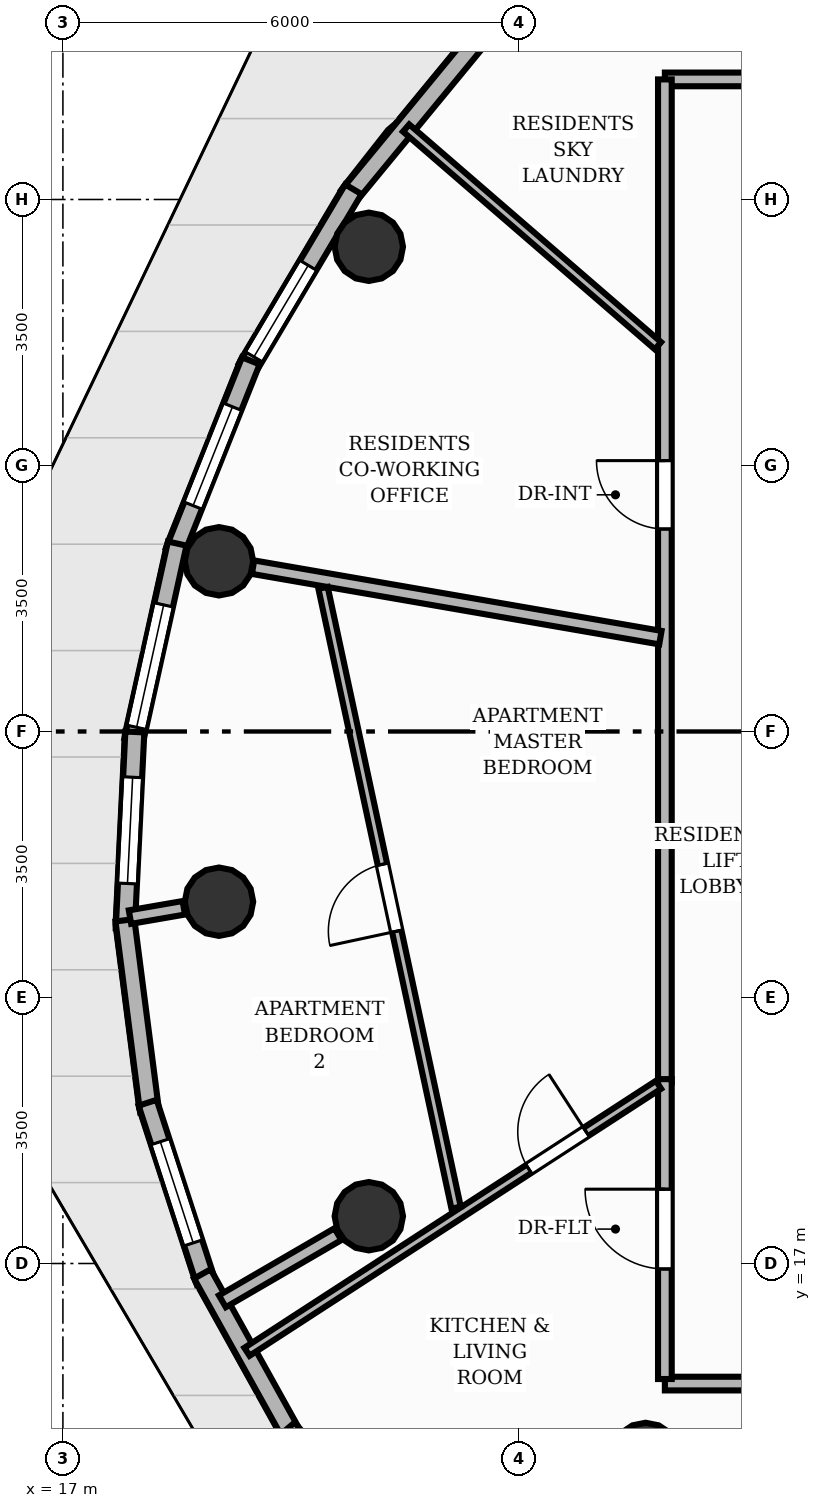
"""IFC4 building model, lengths in metres.
Left out: names, types, materials, properties, quantities, classifications, styles, units other than length and angle.
Written with IfcOpenShell. Run it as: python <this file> out.ifc"""

import sys

from ifc_helpers import new_model, si_unit, direction, frame, frame_2d, origin, origin_2d, place, context, subcontext, project, spatial, rectangle, circle, extrude, element, fill, save


model = new_model("IFC4")
c1 = context("Model", 3, precision=1e-05, world=origin(), true_north=direction((0.0, 1.0)))
c2 = subcontext(c1, "Body", "Model", "MODEL_VIEW")
j1 = project(units=[si_unit("LENGTHUNIT", "METRE"), si_unit("PLANEANGLEUNIT", "RADIAN")], contexts=[c1])
p1 = place(None, origin())
s1 = spatial("IfcSite", under=j1, at=p1, CompositionType="ELEMENT")
p2 = place(p1, origin())
s2 = spatial("IfcBuilding", under=s1, at=p2, CompositionType="ELEMENT")
p3 = place(p2, frame((0.0, 0.0, 185.44)))
s3 = spatial("IfcBuildingStorey", under=s2, at=p3, CompositionType="ELEMENT", Elevation=185.44)
for number, where, z_axis, x_axis in (
    (1, (21.025, 30.378, 0.0), (0.0, 0.0, 1.0), (1.0, 0.0, 0.0)),
    (2, (19.054, 26.24, 0.0), (0.0, 0.0, 1.0), (1.0, 0.0, 0.0)),
    (3, (19.054, 21.76, 0.0), (0.0, 0.0, 1.0), (1.0, 0.0, 0.0)),
    (4, (21.025, 17.622, 0.0), (0.0, 0.0, 1.0), (1.0, 0.0, 0.0)),
    (5, (24.667, 14.455, 0.0), (0.0, 0.0, 1.0), (1.0, 0.0, 0.0)),
):
    element("IfcColumn", number, at=place(p3, frame(where, z_axis=z_axis, x_axis=x_axis)), inside=s3, PredefinedType="COLUMN", context=c2, shape_type="SweptSolid", body=[
        extrude(circle(Radius=0.45, at=origin_2d()), origin(), (0.0, 0.0, 1.0), 3.2),
    ])
p4 = place(p3, frame((20.759, 31.045, 0.0), z_axis=(0.0, 0.0, 1.0), x_axis=(0.635409334306, 0.772175483861, 0.0)))
e6 = element("IfcWall", 6, at=p4, inside=s3, PredefinedType="SOLIDWALL", context=c2, shape_type="SweptSolid", body=[
    extrude(rectangle(XDim=2.758, YDim=0.25, at=frame_2d((1.379, 0.0))), origin(), (0.0, 0.0, 1.0), 2.96),
])
p5 = place(p3, frame((19.424, 28.779, 0.0), z_axis=(0.0, 0.0, 1.0), x_axis=(0.510320389621, 0.859984360287, 0.0)))
e7 = element("IfcWall", 7, at=p5, inside=s3, PredefinedType="SOLIDWALL", context=c2, shape_type="SweptSolid", body=[
    extrude(rectangle(XDim=2.738, YDim=0.25, at=frame_2d((1.369, 0.0))), origin(), (0.0, 0.0, 1.0), 2.96),
])
p6 = place(p5, frame((0.175, 0.0, 0.85)))
e8 = element("IfcOpeningElement", 8, at=p6, cuts=e7, PredefinedType="OPENING", context=c2, shape_type="SweptSolid", body=[
    extrude(rectangle(XDim=1.4, YDim=1.55, at=frame_2d((0.7, 0.775))), frame((0.0, 0.135, 0.0), z_axis=(0.0, -1.0, 0.0), x_axis=(1.0, 0.0, 0.0)), (0.0, 0.0, 1.0), 0.27),
])
p7 = place(p3, frame((18.472, 26.367, 0.0), z_axis=(0.0, 0.0, 1.0), x_axis=(0.370330939431, 0.928899884433, 0.0)))
e9 = element("IfcWall", 9, at=p7, inside=s3, PredefinedType="SOLIDWALL", context=c2, shape_type="SweptSolid", body=[
    extrude(rectangle(XDim=2.702, YDim=0.25, at=frame_2d((1.351, 0.0))), origin(), (0.0, 0.0, 1.0), 2.96),
])
p8 = place(p7, frame((0.651, 0.0, 0.85)))
e10 = element("IfcOpeningElement", 10, at=p8, cuts=e9, PredefinedType="OPENING", context=c2, shape_type="SweptSolid", body=[
    extrude(rectangle(XDim=1.4, YDim=1.55, at=frame_2d((0.7, 0.775))), frame((0.0, 0.135, 0.0), z_axis=(0.0, -1.0, 0.0), x_axis=(1.0, 0.0, 0.0)), (0.0, 0.0, 1.0), 0.27),
])
p9 = place(p3, frame((17.932, 23.884, 0.0), z_axis=(0.0, 0.0, 1.0), x_axis=(0.215877166516, 0.976420528756, 0.0)))
e11 = element("IfcWall", 11, at=p9, inside=s3, PredefinedType="SOLIDWALL", context=c2, shape_type="SweptSolid", body=[
    extrude(rectangle(XDim=2.651, YDim=0.25, at=frame_2d((1.325, 0.0))), origin(), (0.0, 0.0, 1.0), 2.96),
])
p10 = place(p9, frame((0.175, 0.0, 0.85)))
e12 = element("IfcOpeningElement", 12, at=p10, cuts=e11, PredefinedType="OPENING", context=c2, shape_type="SweptSolid", body=[
    extrude(rectangle(XDim=1.65, YDim=1.55, at=frame_2d((0.825, 0.775))), frame((0.0, 0.135, 0.0), z_axis=(0.0, -1.0, 0.0), x_axis=(1.0, 0.0, 0.0)), (0.0, 0.0, 1.0), 0.27),
])
p11 = place(p3, frame((17.82, 21.405, 0.0), z_axis=(0.0, 0.0, 1.0), x_axis=(0.048688181414, 0.99881402723, 0.0)))
e13 = element("IfcWall", 13, at=p11, inside=s3, PredefinedType="SOLIDWALL", context=c2, shape_type="SweptSolid", body=[
    extrude(rectangle(XDim=2.593, YDim=0.25, at=frame_2d((1.296, 0.0))), origin(), (0.0, 0.0, 1.0), 2.96),
])
p12 = place(p11, frame((0.596, 0.0, 0.85)))
e14 = element("IfcOpeningElement", 14, at=p12, cuts=e13, PredefinedType="OPENING", context=c2, shape_type="SweptSolid", body=[
    extrude(rectangle(XDim=1.4, YDim=1.55, at=frame_2d((0.7, 0.775))), frame((0.0, 0.135, 0.0), z_axis=(0.0, -1.0, 0.0), x_axis=(1.0, 0.0, 0.0)), (0.0, 0.0, 1.0), 0.27),
])
p13 = place(p3, frame((18.14, 19.005, 0.0), z_axis=(0.0, 0.0, 1.0), x_axis=(-0.128057007482, 0.991766808698, 0.0)))
e15 = element("IfcWall", 15, at=p13, inside=s3, PredefinedType="SOLIDWALL", context=c2, shape_type="SweptSolid", body=[
    extrude(rectangle(XDim=2.532, YDim=0.25, at=frame_2d((1.266, 0.0))), origin(), (0.0, 0.0, 1.0), 2.96),
])
p14 = place(p3, frame((18.881, 16.759, 0.0), z_axis=(0.0, 0.0, 1.0), x_axis=(-0.309005861828, 0.951060133407, 0.0)))
e16 = element("IfcWall", 16, at=p14, inside=s3, PredefinedType="SOLIDWALL", context=c2, shape_type="SweptSolid", body=[
    extrude(rectangle(XDim=2.478, YDim=0.25, at=frame_2d((1.239, 0.0))), origin(), (0.0, 0.0, 1.0), 2.96),
])
p15 = place(p14, frame((0.539, 0.0, 0.85)))
e17 = element("IfcOpeningElement", 17, at=p15, cuts=e16, PredefinedType="OPENING", context=c2, shape_type="SweptSolid", body=[
    extrude(rectangle(XDim=1.4, YDim=1.55, at=frame_2d((0.7, 0.775))), frame((0.0, 0.135, 0.0), z_axis=(0.0, -1.0, 0.0), x_axis=(1.0, 0.0, 0.0)), (0.0, 0.0, 1.0), 0.27),
])
p16 = place(p3, frame((20.019, 14.733, 0.0), z_axis=(0.0, 0.0, 1.0), x_axis=(-0.485821561791, 0.874058013005, 0.0)))
e18 = element("IfcWall", 18, at=p16, inside=s3, PredefinedType="SOLIDWALL", context=c2, shape_type="SweptSolid", body=[
    extrude(rectangle(XDim=2.437, YDim=0.25, at=frame_2d((1.218, 0.0))), origin(), (0.0, 0.0, 1.0), 2.96),
])
p17 = place(p3, frame((21.521, 12.99, 0.0), z_axis=(0.0, 0.0, 1.0), x_axis=(-0.648874307696, 0.760895612297, 0.0)))
e19 = element("IfcWall", 19, at=p17, inside=s3, PredefinedType="SOLIDWALL", context=c2, shape_type="SweptSolid", body=[
    extrude(rectangle(XDim=2.415, YDim=0.25, at=frame_2d((1.208, 0.0))), origin(), (0.0, 0.0, 1.0), 2.96),
])
p18 = place(p17, frame((0.632, 0.0, 0.0)))
e20 = element("IfcOpeningElement", 20, at=p18, cuts=e19, PredefinedType="OPENING", context=c2, shape_type="SweptSolid", body=[
    extrude(rectangle(XDim=1.15, YDim=2.2, at=frame_2d((0.575, 1.1))), frame((0.0, 0.135, 0.0), z_axis=(0.0, -1.0, 0.0), x_axis=(1.0, 0.0, 0.0)), (0.0, 0.0, 1.0), 0.27),
])
p19 = place(p3, frame((18.591, 21.68, 0.0), z_axis=(0.0, 0.0, 1.0), x_axis=(-0.985336223431, -0.170623933826, 0.0)))
e21 = element("IfcWall", 21, at=p19, inside=s3, PredefinedType="PARTITIONING", context=c2, shape_type="SweptSolid", body=[
    extrude(rectangle(XDim=0.718, YDim=0.18, at=frame_2d((0.359, 0.0))), origin(), (0.0, 0.0, 1.0), 2.404),
])
p20 = place(p3, frame((20.618, 17.386, 0.0), z_axis=(0.0, 0.0, 1.0), x_axis=(-0.86461381872, -0.502437005482, 0.0)))
e22 = element("IfcWall", 22, at=p20, inside=s3, PredefinedType="PARTITIONING", context=c2, shape_type="SweptSolid", body=[
    extrude(rectangle(XDim=1.758, YDim=0.18, at=frame_2d((0.879, 0.0))), origin(), (0.0, 0.0, 1.0), 2.404),
])
p21 = place(p3, frame((24.92, 32.58, 0.0), z_axis=(0.0, 0.0, 1.0), x_axis=(1.0, 0.0, 0.0)))
e23 = element("IfcWall", 23, at=p21, inside=s3, PredefinedType="PARTITIONING", context=c2, shape_type="SweptSolid", body=[
    extrude(rectangle(XDim=14.16, YDim=0.18, at=frame_2d((7.08, 0.0))), origin(), (0.0, 0.0, 1.0), 2.955),
])
p22 = place(p21, frame((8.186, 0.0, 0.0)))
e24 = element("IfcOpeningElement", 24, at=p22, cuts=e23, PredefinedType="OPENING", context=c2, shape_type="SweptSolid", body=[
    extrude(rectangle(XDim=1.05, YDim=2.15, at=frame_2d((0.525, 1.075))), frame((0.0, 0.1, 0.0), z_axis=(0.0, -1.0, 0.0), x_axis=(1.0, 0.0, 0.0)), (0.0, 0.0, 1.0), 0.2),
])
p23 = place(p21, frame((2.119, 0.0, 0.0)))
e25 = element("IfcOpeningElement", 25, at=p23, cuts=e23, PredefinedType="OPENING", context=c2, shape_type="SweptSolid", body=[
    extrude(rectangle(XDim=0.9, YDim=2.1, at=frame_2d((0.45, 1.05))), frame((0.0, 0.1, 0.0), z_axis=(0.0, -1.0, 0.0), x_axis=(1.0, 0.0, 0.0)), (0.0, 0.0, 1.0), 0.2),
])
p24 = place(p3, frame((24.92, 19.382, 0.0), z_axis=(0.0, 0.0, 1.0), x_axis=(0.0, 1.0, 0.0)))
e26 = element("IfcWall", 26, at=p24, inside=s3, PredefinedType="PARTITIONING", context=c2, shape_type="SweptSolid", body=[
    extrude(rectangle(XDim=13.198, YDim=0.18, at=frame_2d((6.599, 0.0))), origin(), (0.0, 0.0, 1.0), 2.955),
])
p25 = place(p24, frame((7.282, 0.0, 0.0)))
e27 = element("IfcOpeningElement", 27, at=p25, cuts=e26, PredefinedType="OPENING", context=c2, shape_type="SweptSolid", body=[
    extrude(rectangle(XDim=0.9, YDim=2.1, at=frame_2d((0.45, 1.05))), frame((0.0, 0.1, 0.0), z_axis=(0.0, -1.0, 0.0), x_axis=(1.0, 0.0, 0.0)), (0.0, 0.0, 1.0), 0.2),
])
p26 = place(p3, frame((28.531, 15.42, 0.0), z_axis=(0.0, 0.0, 1.0), x_axis=(-1.0, 0.0, 0.0)))
e28 = element("IfcWall", 28, at=p26, inside=s3, PredefinedType="PARTITIONING", context=c2, shape_type="SweptSolid", body=[
    extrude(rectangle(XDim=3.611, YDim=0.18, at=frame_2d((1.805, 0.0))), origin(), (0.0, 0.0, 1.0), 2.955),
])
p27 = place(p3, frame((24.92, 15.48, 0.0), z_axis=(0.0, 0.0, 1.0), x_axis=(0.0, 1.0, 0.0)))
e29 = element("IfcWall", 29, at=p27, inside=s3, PredefinedType="PARTITIONING", context=c2, shape_type="SweptSolid", body=[
    extrude(rectangle(XDim=3.946, YDim=0.18, at=frame_2d((1.973, 0.0))), origin(), (0.0, 0.0, 1.0), 2.955),
])
p28 = place(p27, frame((1.448, 0.0, 0.0)))
e30 = element("IfcOpeningElement", 30, at=p28, cuts=e29, PredefinedType="OPENING", context=c2, shape_type="SweptSolid", body=[
    extrude(rectangle(XDim=1.05, YDim=2.15, at=frame_2d((0.525, 1.075))), frame((0.0, 0.1, 0.0), z_axis=(0.0, -1.0, 0.0), x_axis=(1.0, 0.0, 0.0)), (0.0, 0.0, 1.0), 0.2),
])
p29 = place(p3, frame((21.515, 31.941, 0.0), z_axis=(0.0, 0.0, 1.0), x_axis=(0.756468247818, -0.654030419815, 0.0)))
e31 = element("IfcWall", 31, at=p29, inside=s3, PredefinedType="PARTITIONING", context=c2, shape_type="SweptSolid", body=[
    extrude(rectangle(XDim=4.381, YDim=0.125, at=frame_2d((2.19, 0.0))), origin(), (0.0, 0.0, 1.0), 2.692),
])
p30 = place(p3, frame((24.861, 25.235, 0.0), z_axis=(0.0, 0.0, 1.0), x_axis=(-0.985368487575, 0.170437506711, 0.0)))
e32 = element("IfcWall", 32, at=p30, inside=s3, PredefinedType="PARTITIONING", context=c2, shape_type="SweptSolid", body=[
    extrude(rectangle(XDim=5.439, YDim=0.18, at=frame_2d((2.719, 0.0))), origin(), (0.0, 0.0, 1.0), 2.404),
])
p31 = place(p3, frame((28.452, 15.339, 0.0), z_axis=(0.0, 0.0, 1.0), x_axis=(-0.583489481732, -0.812120695899, 0.0)))
e33 = element("IfcWall", 33, at=p31, inside=s3, PredefinedType="PLUMBINGWALL", context=c2, shape_type="SweptSolid", body=[
    extrude(rectangle(XDim=5.698, YDim=0.16, at=frame_2d((2.849, 0.0))), origin(), (0.0, 0.0, 1.0), 2.692),
])
p32 = place(p31, frame((2.399, 0.0, 0.0)))
e34 = element("IfcOpeningElement", 34, at=p32, cuts=e33, PredefinedType="OPENING", context=c2, shape_type="SweptSolid", body=[
    extrude(rectangle(XDim=0.9, YDim=2.1, at=frame_2d((0.45, 1.05))), frame((0.0, 0.09, 0.0), z_axis=(0.0, -1.0, 0.0), x_axis=(1.0, 0.0, 0.0)), (0.0, 0.0, 1.0), 0.18),
])
p33 = place(p3, frame((19.422, 15.838, 0.0), z_axis=(0.0, 0.0, 1.0), x_axis=(0.838876327826, 0.544322061479, 0.0)))
e35 = element("IfcWall", 35, at=p33, inside=s3, PredefinedType="PARTITIONING", context=c2, shape_type="SweptSolid", body=[
    extrude(rectangle(XDim=6.454, YDim=0.125, at=frame_2d((3.227, 0.0))), origin(), (0.0, 0.0, 1.0), 2.955),
])
p34 = place(p33, frame((4.419, 0.0, 0.0)))
e36 = element("IfcOpeningElement", 36, at=p34, cuts=e35, PredefinedType="OPENING", context=c2, shape_type="SweptSolid", body=[
    extrude(rectangle(XDim=0.9, YDim=2.1, at=frame_2d((0.45, 1.05))), frame((0.0, 0.073, 0.0), z_axis=(0.0, -1.0, 0.0), x_axis=(1.0, 0.0, 0.0)), (0.0, 0.0, 1.0), 0.145),
])
p35 = place(p3, frame((22.173, 17.735, 0.0), z_axis=(0.0, 0.0, 1.0), x_axis=(-0.20987090056, 0.977729106194, 0.0)))
e37 = element("IfcWall", 37, at=p35, inside=s3, PredefinedType="PARTITIONING", context=c2, shape_type="SweptSolid", body=[
    extrude(rectangle(XDim=8.341, YDim=0.125, at=frame_2d((4.17, 0.0))), origin(), (0.0, 0.0, 1.0), 2.955),
])
p36 = place(p35, frame((3.72, 0.0, 0.0)))
e38 = element("IfcOpeningElement", 38, at=p36, cuts=e37, PredefinedType="OPENING", context=c2, shape_type="SweptSolid", body=[
    extrude(rectangle(XDim=0.9, YDim=2.1, at=frame_2d((0.45, 1.05))), frame((0.0, 0.073, 0.0), z_axis=(0.0, -1.0, 0.0), x_axis=(1.0, 0.0, 0.0)), (0.0, 0.0, 1.0), 0.145),
])
p37 = place(p6, origin())
e39 = element("IfcWindow", 39, at=p37, inside=s3, PartitioningType="SINGLE_PANEL", PredefinedType="WINDOW", context=c2, shape_type="SweptSolid", body=[
    extrude(rectangle(XDim=1.4, YDim=1.55, at=frame_2d((0.7, 0.775))), frame((0.0, 0.03, 0.0), z_axis=(0.0, -1.0, 0.0), x_axis=(1.0, 0.0, 0.0)), (0.0, 0.0, 1.0), 0.06),
])
fill(e8, e39)
p38 = place(p8, origin())
e40 = element("IfcWindow", 40, at=p38, inside=s3, PartitioningType="SINGLE_PANEL", PredefinedType="WINDOW", context=c2, shape_type="SweptSolid", body=[
    extrude(rectangle(XDim=1.4, YDim=1.55, at=frame_2d((0.7, 0.775))), frame((0.0, 0.03, 0.0), z_axis=(0.0, -1.0, 0.0), x_axis=(1.0, 0.0, 0.0)), (0.0, 0.0, 1.0), 0.06),
])
fill(e10, e40)
p39 = place(p10, origin())
e41 = element("IfcWindow", 41, at=p39, inside=s3, PartitioningType="SINGLE_PANEL", PredefinedType="WINDOW", context=c2, shape_type="SweptSolid", body=[
    extrude(rectangle(XDim=1.65, YDim=1.55, at=frame_2d((0.825, 0.775))), frame((0.0, 0.03, 0.0), z_axis=(0.0, -1.0, 0.0), x_axis=(1.0, 0.0, 0.0)), (0.0, 0.0, 1.0), 0.06),
])
fill(e12, e41)
p40 = place(p12, origin())
e42 = element("IfcWindow", 42, at=p40, inside=s3, PartitioningType="SINGLE_PANEL", PredefinedType="WINDOW", context=c2, shape_type="SweptSolid", body=[
    extrude(rectangle(XDim=1.4, YDim=1.55, at=frame_2d((0.7, 0.775))), frame((0.0, 0.03, 0.0), z_axis=(0.0, -1.0, 0.0), x_axis=(1.0, 0.0, 0.0)), (0.0, 0.0, 1.0), 0.06),
])
fill(e14, e42)
p41 = place(p15, origin())
e43 = element("IfcWindow", 43, at=p41, inside=s3, PartitioningType="SINGLE_PANEL", PredefinedType="WINDOW", context=c2, shape_type="SweptSolid", body=[
    extrude(rectangle(XDim=1.4, YDim=1.55, at=frame_2d((0.7, 0.775))), frame((0.0, 0.03, 0.0), z_axis=(0.0, -1.0, 0.0), x_axis=(1.0, 0.0, 0.0)), (0.0, 0.0, 1.0), 0.06),
])
fill(e17, e43)
p42 = place(p25, origin())
e44 = element("IfcDoor", 44, at=p42, inside=s3, OperationType="SINGLE_SWING_RIGHT", PredefinedType="DOOR", context=c2, shape_type="SweptSolid", body=[
    extrude(rectangle(XDim=0.9, YDim=2.1, at=frame_2d((0.45, 1.05))), frame((0.0, 0.025, 0.0), z_axis=(0.0, -1.0, 0.0), x_axis=(1.0, 0.0, 0.0)), (0.0, 0.0, 1.0), 0.05),
])
fill(e27, e44)
p43 = place(p28, origin())
e45 = element("IfcDoor", 45, at=p43, inside=s3, OperationType="SINGLE_SWING_RIGHT", PredefinedType="DOOR", context=c2, shape_type="SweptSolid", body=[
    extrude(rectangle(XDim=1.05, YDim=2.15, at=frame_2d((0.525, 1.075))), frame((0.0, 0.025, 0.0), z_axis=(0.0, -1.0, 0.0), x_axis=(1.0, 0.0, 0.0)), (0.0, 0.0, 1.0), 0.05),
])
fill(e30, e45)
p44 = place(p34, origin())
e46 = element("IfcDoor", 46, at=p44, inside=s3, OperationType="SINGLE_SWING_RIGHT", PredefinedType="DOOR", context=c2, shape_type="SweptSolid", body=[
    extrude(rectangle(XDim=0.9, YDim=2.1, at=frame_2d((0.45, 1.05))), frame((0.0, 0.025, 0.0), z_axis=(0.0, -1.0, 0.0), x_axis=(1.0, 0.0, 0.0)), (0.0, 0.0, 1.0), 0.05),
])
fill(e36, e46)
p45 = place(p36, origin())
e47 = element("IfcDoor", 47, at=p45, inside=s3, OperationType="SINGLE_SWING_LEFT", PredefinedType="DOOR", context=c2, shape_type="SweptSolid", body=[
    extrude(rectangle(XDim=0.9, YDim=2.1, at=frame_2d((0.45, 1.05))), frame((0.0, 0.025, 0.0), z_axis=(0.0, -1.0, 0.0), x_axis=(1.0, 0.0, 0.0)), (0.0, 0.0, 1.0), 0.05),
])
fill(e38, e47)
save(model, sys.argv[1])
